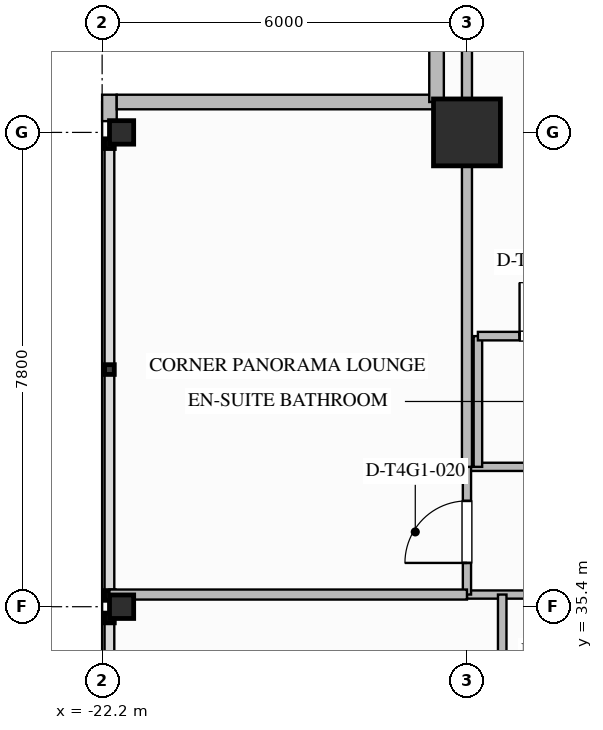
"""IFC4 building model, lengths in metres.
Left out: names, types, materials, properties, quantities, classifications, styles, units other than length and angle.
Written with IfcOpenShell. Run it as: python <this file> out.ifc"""

import sys

from ifc_helpers import new_model, si_unit, direction, frame, frame_2d, origin, origin_2d, place, context, subcontext, project, spatial, rectangle, i_section, extrude, element, fill, save


model = new_model("IFC4")
c1 = context("Model", 3, precision=1e-05, world=origin(), true_north=direction((0.0, 1.0)))
c2 = subcontext(c1, "Body", "Model", "MODEL_VIEW")
j1 = project(units=[si_unit("LENGTHUNIT", "METRE"), si_unit("PLANEANGLEUNIT", "RADIAN")], contexts=[c1])
p1 = place(None, origin())
s1 = spatial("IfcSite", under=j1, at=p1, CompositionType="ELEMENT")
p2 = place(p1, origin())
s2 = spatial("IfcBuilding", under=s1, at=p2, CompositionType="ELEMENT")
p3 = place(p2, frame((0.0, 0.0, 208.7)))
s3 = spatial("IfcBuildingStorey", under=s2, at=p3, CompositionType="ELEMENT", Elevation=208.7)
p4 = place(p3, frame((-16.2, 43.2, 0.0), z_axis=(0.0, 0.0, 1.0), x_axis=(1.0, 0.0, 0.0)))
e1 = element("IfcColumn", 1, at=p4, inside=s3, PredefinedType="COLUMN", context=c2, shape_type="SweptSolid", body=[
    extrude(rectangle(XDim=1.1, YDim=1.1, at=origin_2d()), origin(), (0.0, 0.0, 1.0), 3.6),
])
for number, where, z_axis, x_axis in (
    (2, (-21.88, 35.4, 0.0), (0.0, 0.0, 1.0), (1.0, 0.0, 0.0)),
    (3, (-21.88, 43.2, 0.0), (0.0, 0.0, 1.0), (1.0, 0.0, 0.0)),
):
    element("IfcColumn", number, at=place(p3, frame(where, z_axis=z_axis, x_axis=x_axis)), inside=s3, PredefinedType="COLUMN", context=c2, shape_type="SweptSolid", body=[
        extrude(i_section(OverallWidth=0.397, OverallDepth=0.387, WebThickness=0.021, FlangeThickness=0.033, FilletRadius=0.025, at=origin_2d()), origin(), (0.0, 0.0, 1.0), 3.597),
    ])
p5 = place(p3, frame((-22.08, 43.385, 0.0), z_axis=(0.0, 0.0, 1.0), x_axis=(0.0, 1.0, 0.0)))
e4 = element("IfcWall", 4, at=p5, inside=s3, PredefinedType="STANDARD", context=c2, shape_type="SweptSolid", body=[
    extrude(rectangle(XDim=0.435, YDim=0.24, at=frame_2d((0.217, 0.0))), origin(), (0.0, 0.0, 1.0), 3.34),
])
for number, where, z_axis, x_axis in (
    (5, (-21.96, 43.7, 0.0), (0.0, 0.0, 1.0), (1.0, 0.0, 0.0)),
    (6, (-16.7, 43.7, 0.0), (0.0, 0.0, 1.0), (0.0, 1.0, 0.0)),
):
    element("IfcWall", number, at=place(p3, frame(where, z_axis=z_axis, x_axis=x_axis)), inside=s3, PredefinedType="STANDARD", context=c2, shape_type="SweptSolid", body=[
        extrude(rectangle(XDim=5.26, YDim=0.24, at=frame_2d((2.63, 0.0))), origin(), (0.0, 0.0, 1.0), 3.34),
    ])
p6 = place(p3, frame((-16.2, 37.7, 0.0), z_axis=(0.0, 0.0, 1.0), x_axis=(1.0, 0.0, 0.0)))
e7 = element("IfcWall", 7, at=p6, inside=s3, PredefinedType="PARTITIONING", context=c2, shape_type="SweptSolid", body=[
    extrude(rectangle(XDim=38.28, YDim=0.135, at=frame_2d((19.14, 0.0))), origin(), (0.0, 0.0, 1.0), 3.34),
])
p7 = place(p6, frame((35.785, 0.0, 0.0)))
e8 = element("IfcOpeningElement", 8, at=p7, cuts=e7, PredefinedType="OPENING", context=c2, shape_type="SweptSolid", body=[
    extrude(rectangle(XDim=1.26, YDim=2.2, at=frame_2d((0.63, 1.1))), frame((0.0, 0.077, 0.0), z_axis=(0.0, -1.0, 0.0), x_axis=(1.0, 0.0, 0.0)), (0.0, 0.0, 1.0), 0.155),
])
p8 = place(p6, frame((3.189, 0.0, 0.0)))
e9 = element("IfcOpeningElement", 9, at=p8, cuts=e7, PredefinedType="OPENING", context=c2, shape_type="SweptSolid", body=[
    extrude(rectangle(XDim=0.96, YDim=2.15, at=frame_2d((0.48, 1.075))), frame((0.0, 0.077, 0.0), z_axis=(0.0, -1.0, 0.0), x_axis=(1.0, 0.0, 0.0)), (0.0, 0.0, 1.0), 0.155),
])
p9 = place(p6, frame((8.379, 0.0, 0.0)))
e10 = element("IfcOpeningElement", 10, at=p9, cuts=e7, PredefinedType="OPENING", context=c2, shape_type="SweptSolid", body=[
    extrude(rectangle(XDim=0.96, YDim=2.15, at=frame_2d((0.48, 1.075))), frame((0.0, 0.077, 0.0), z_axis=(0.0, -1.0, 0.0), x_axis=(1.0, 0.0, 0.0)), (0.0, 0.0, 1.0), 0.155),
])
p10 = place(p6, frame((14.025, 0.0, 0.0)))
e11 = element("IfcOpeningElement", 11, at=p10, cuts=e7, PredefinedType="OPENING", context=c2, shape_type="SweptSolid", body=[
    extrude(rectangle(XDim=0.96, YDim=2.15, at=frame_2d((0.48, 1.075))), frame((0.0, 0.077, 0.0), z_axis=(0.0, -1.0, 0.0), x_axis=(1.0, 0.0, 0.0)), (0.0, 0.0, 1.0), 0.155),
])
p11 = place(p6, frame((18.18, 0.0, 0.0)))
e12 = element("IfcOpeningElement", 12, at=p11, cuts=e7, PredefinedType="OPENING", context=c2, shape_type="SweptSolid", body=[
    extrude(rectangle(XDim=1.02, YDim=2.15, at=frame_2d((0.51, 1.075))), frame((0.0, 0.077, 0.0), z_axis=(0.0, -1.0, 0.0), x_axis=(1.0, 0.0, 0.0)), (0.0, 0.0, 1.0), 0.155),
])
p12 = place(p6, frame((25.071, 0.0, 0.0)))
e13 = element("IfcOpeningElement", 13, at=p12, cuts=e7, PredefinedType="OPENING", context=c2, shape_type="SweptSolid", body=[
    extrude(rectangle(XDim=0.96, YDim=2.15, at=frame_2d((0.48, 1.075))), frame((0.0, 0.077, 0.0), z_axis=(0.0, -1.0, 0.0), x_axis=(1.0, 0.0, 0.0)), (0.0, 0.0, 1.0), 0.155),
])
p13 = place(p6, frame((30.68, 0.0, 0.0)))
e14 = element("IfcOpeningElement", 14, at=p13, cuts=e7, PredefinedType="OPENING", context=c2, shape_type="SweptSolid", body=[
    extrude(rectangle(XDim=0.96, YDim=2.15, at=frame_2d((0.48, 1.075))), frame((0.0, 0.077, 0.0), z_axis=(0.0, -1.0, 0.0), x_axis=(1.0, 0.0, 0.0)), (0.0, 0.0, 1.0), 0.155),
])
p14 = place(p3, frame((-16.2, 35.6, 0.0), z_axis=(0.0, 0.0, 1.0), x_axis=(1.0, 0.0, 0.0)))
e15 = element("IfcWall", 15, at=p14, inside=s3, PredefinedType="PARTITIONING", context=c2, shape_type="SweptSolid", body=[
    extrude(rectangle(XDim=7.6, YDim=0.135, at=frame_2d((3.8, 0.0))), origin(), (0.0, 0.0, 1.0), 2.718),
])
p15 = place(p14, frame((4.585, 0.0, 0.0)))
e16 = element("IfcOpeningElement", 16, at=p15, cuts=e15, PredefinedType="OPENING", context=c2, shape_type="SweptSolid", body=[
    extrude(rectangle(XDim=1.26, YDim=2.2, at=frame_2d((0.63, 1.1))), frame((0.0, 0.077, 0.0), z_axis=(0.0, -1.0, 0.0), x_axis=(1.0, 0.0, 0.0)), (0.0, 0.0, 1.0), 0.155),
])
p16 = place(p3, frame((-16.2, 35.6, 0.0), z_axis=(0.0, 0.0, 1.0), x_axis=(0.0, 1.0, 0.0)))
e17 = element("IfcWall", 17, at=p16, inside=s3, PredefinedType="PARTITIONING", context=c2, shape_type="SweptSolid", body=[
    extrude(rectangle(XDim=2.1, YDim=0.135, at=frame_2d((1.05, 0.0))), origin(), (0.0, 0.0, 1.0), 2.714),
])
p17 = place(p16, frame((0.52, 0.0, 0.0)))
e18 = element("IfcOpeningElement", 18, at=p17, cuts=e17, PredefinedType="OPENING", context=c2, shape_type="SweptSolid", body=[
    extrude(rectangle(XDim=1.02, YDim=2.15, at=frame_2d((0.51, 1.075))), frame((0.0, 0.077, 0.0), z_axis=(0.0, -1.0, 0.0), x_axis=(1.0, 0.0, 0.0)), (0.0, 0.0, 1.0), 0.155),
])
p18 = place(p3, frame((-16.2, 37.7, 0.0), z_axis=(0.0, 0.0, 1.0), x_axis=(0.0, 1.0, 0.0)))
e19 = element("IfcWall", 19, at=p18, inside=s3, PredefinedType="PARTITIONING", context=c2, shape_type="SweptSolid", body=[
    extrude(rectangle(XDim=11.38, YDim=0.165, at=frame_2d((5.69, 0.0))), origin(), (0.0, 0.0, 1.0), 2.714),
])
p19 = place(p3, frame((-22.08, 35.6, 0.0), z_axis=(0.0, 0.0, 1.0), x_axis=(1.0, 0.0, 0.0)))
e20 = element("IfcWall", 20, at=p19, inside=s3, PredefinedType="PARTITIONING", context=c2, shape_type="SweptSolid", body=[
    extrude(rectangle(XDim=5.88, YDim=0.165, at=frame_2d((2.94, 0.0))), origin(), (0.0, 0.0, 1.0), 2.714),
])
p20 = place(p3, frame((-16.02, 37.7, 0.0), z_axis=(0.0, 0.0, 1.0), x_axis=(0.0, 1.0, 0.0)))
e21 = element("IfcWall", 21, at=p20, inside=s3, PredefinedType="PLUMBINGWALL", context=c2, shape_type="SweptSolid", body=[
    extrude(rectangle(XDim=2.15, YDim=0.14, at=frame_2d((1.075, 0.0))), origin(), (0.0, 0.0, 1.0), 2.714),
])
p21 = place(p3, frame((-16.02, 39.85, 0.0), z_axis=(0.0, 0.0, 1.0), x_axis=(1.0, 0.0, 0.0)))
e22 = element("IfcWall", 22, at=p21, inside=s3, PredefinedType="PLUMBINGWALL", context=c2, shape_type="SweptSolid", body=[
    extrude(rectangle(XDim=2.25, YDim=0.14, at=frame_2d((1.125, 0.0))), origin(), (0.0, 0.0, 1.0), 3.34),
])
p22 = place(p21, frame((0.685, 0.0, 0.0)))
e23 = element("IfcOpeningElement", 23, at=p22, cuts=e22, PredefinedType="OPENING", context=c2, shape_type="SweptSolid", body=[
    extrude(rectangle(XDim=0.88, YDim=2.1, at=frame_2d((0.44, 1.05))), frame((0.0, 0.08, 0.0), z_axis=(0.0, -1.0, 0.0), x_axis=(1.0, 0.0, 0.0)), (0.0, 0.0, 1.0), 0.16),
])
p23 = place(p3, frame((-15.62, 35.6, 0.0), z_axis=(0.0, 0.0, 1.0), x_axis=(0.0, -1.0, 0.0)))
e24 = element("IfcWall", 24, at=p23, inside=s3, PredefinedType="PLUMBINGWALL", context=c2, shape_type="SweptSolid", body=[
    extrude(rectangle(XDim=2.15, YDim=0.14, at=frame_2d((1.075, 0.0))), origin(), (0.0, 0.0, 1.0), 3.34),
])
p24 = place(p17, origin())
e25 = element("IfcDoor", 25, at=p24, inside=s3, OperationType="SINGLE_SWING_LEFT", PredefinedType="DOOR", context=c2, shape_type="SweptSolid", body=[
    extrude(rectangle(XDim=1.02, YDim=2.15, at=frame_2d((0.51, 1.075))), frame((0.0, 0.025, 0.0), z_axis=(0.0, -1.0, 0.0), x_axis=(1.0, 0.0, 0.0)), (0.0, 0.0, 1.0), 0.05),
])
fill(e18, e25)
p25 = place(p22, origin())
e26 = element("IfcDoor", 26, at=p25, inside=s3, OperationType="SINGLE_SWING_LEFT", PredefinedType="DOOR", context=c2, shape_type="SweptSolid", body=[
    extrude(rectangle(XDim=0.88, YDim=2.1, at=frame_2d((0.44, 1.05))), frame((0.0, 0.025, 0.0), z_axis=(0.0, -1.0, 0.0), x_axis=(1.0, 0.0, 0.0)), (0.0, 0.0, 1.0), 0.05),
])
fill(e23, e26)
save(model, sys.argv[1])
